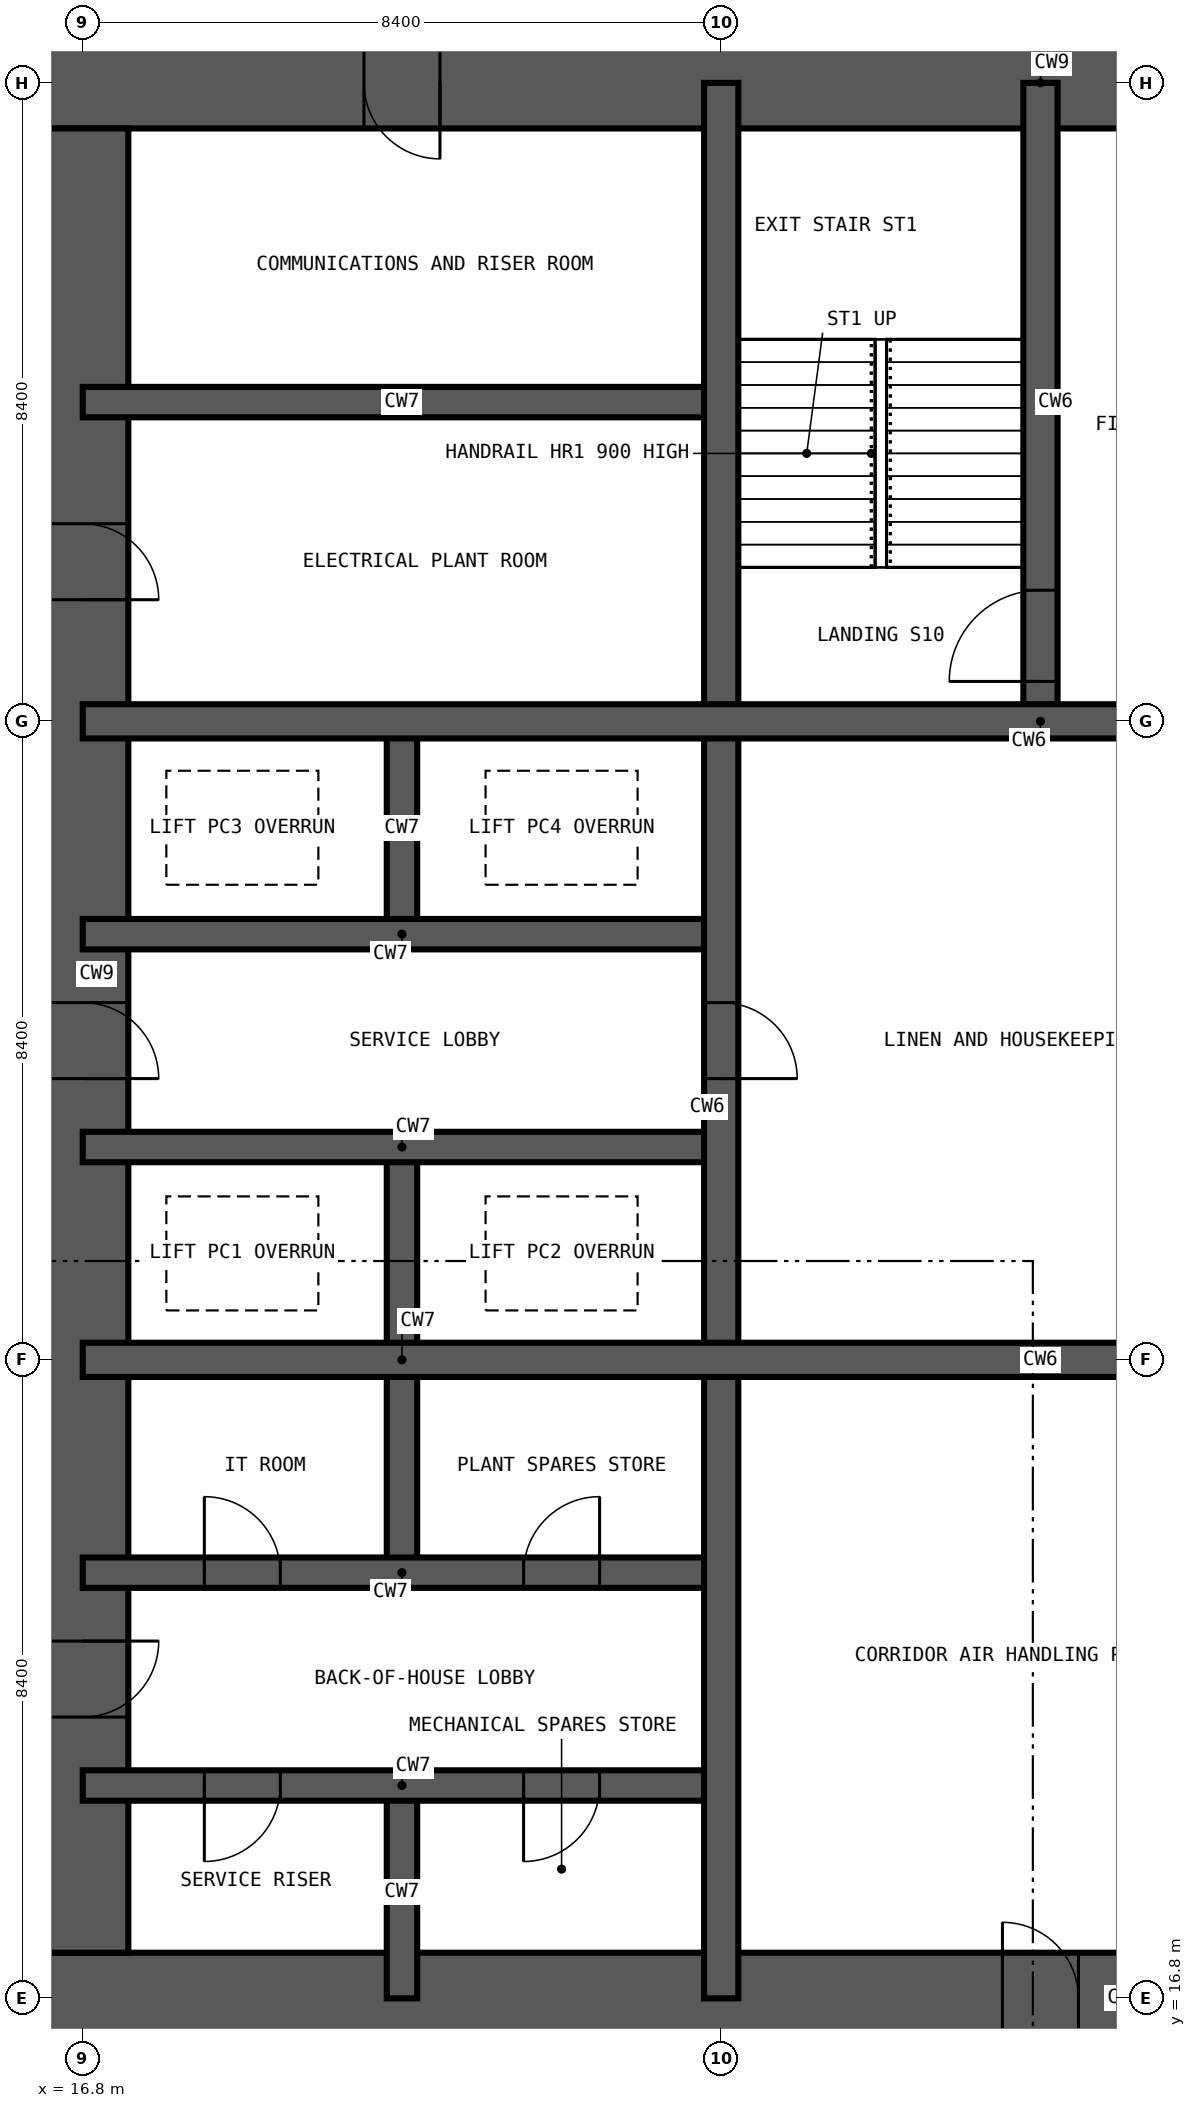
"""IFC4 building model, lengths in metres.
Left out: names, types, materials, properties, quantities, classifications, styles, units other than length and angle.
Written with IfcOpenShell. Run it as: python <this file> out.ifc"""

import sys

from ifc_helpers import new_model, si_unit, direction, frame, frame_2d, origin, place, context, subcontext, project, spatial, rectangle, extrude, element, fill, save


model = new_model("IFC4")
c1 = context("Model", 3, precision=1e-05, world=origin(), true_north=direction((0.0, 1.0)))
c2 = subcontext(c1, "Body", "Model", "MODEL_VIEW")
j1 = project(units=[si_unit("LENGTHUNIT", "METRE"), si_unit("PLANEANGLEUNIT", "RADIAN")], contexts=[c1])
p1 = place(None, origin())
s1 = spatial("IfcSite", under=j1, at=p1, CompositionType="ELEMENT")
p2 = place(p1, origin())
s2 = spatial("IfcBuilding", under=s1, at=p2, CompositionType="ELEMENT")
p3 = place(p2, frame((0.0, 0.0, 220.2)))
s3 = spatial("IfcBuildingStorey", under=s2, at=p3, CompositionType="ELEMENT", Elevation=220.2)
p4 = place(p3, frame((16.2, 16.8, -0.4), z_axis=(0.0, 0.0, 1.0), x_axis=(1.0, 0.0, 0.0)))
e1 = element("IfcWall", 1, at=p4, inside=s3, PredefinedType="SHEAR", context=c2, shape_type="SweptSolid", body=[
    extrude(rectangle(XDim=26.4, YDim=1.2, at=frame_2d((13.2, 0.0))), origin(), (0.0, 0.0, 1.0), 5.45),
])
p5 = place(p4, frame((12.7, 0.0, 0.4)))
e2 = element("IfcOpeningElement", 2, at=p5, cuts=e1, PredefinedType="OPENING", context=c2, shape_type="SweptSolid", body=[
    extrude(rectangle(XDim=1.0, YDim=2.1, at=frame_2d((0.5, 1.05))), frame((0.0, 0.61, 0.0), z_axis=(0.0, -1.0, 0.0), x_axis=(1.0, 0.0, 0.0)), (0.0, 0.0, 1.0), 1.22),
])
p6 = place(p4, frame((19.0, 0.0, 0.4)))
e3 = element("IfcOpeningElement", 3, at=p6, cuts=e1, PredefinedType="OPENING", context=c2, shape_type="SweptSolid", body=[
    extrude(rectangle(XDim=1.0, YDim=2.1, at=frame_2d((0.5, 1.05))), frame((0.0, 0.61, 0.0), z_axis=(0.0, -1.0, 0.0), x_axis=(1.0, 0.0, 0.0)), (0.0, 0.0, 1.0), 1.22),
])
p7 = place(p3, frame((42.6, 42.0, -0.4), z_axis=(0.0, 0.0, 1.0), x_axis=(-1.0, 0.0, 0.0)))
e4 = element("IfcWall", 4, at=p7, inside=s3, PredefinedType="SHEAR", context=c2, shape_type="SweptSolid", body=[
    extrude(rectangle(XDim=26.4, YDim=1.2, at=frame_2d((13.2, 0.0))), origin(), (0.0, 0.0, 1.0), 5.45),
])
p8 = place(p7, frame((21.1, 0.0, 0.4)))
e5 = element("IfcOpeningElement", 5, at=p8, cuts=e4, PredefinedType="OPENING", context=c2, shape_type="SweptSolid", body=[
    extrude(rectangle(XDim=1.0, YDim=2.1, at=frame_2d((0.5, 1.05))), frame((0.0, 0.61, 0.0), z_axis=(0.0, -1.0, 0.0), x_axis=(1.0, 0.0, 0.0)), (0.0, 0.0, 1.0), 1.22),
])
p9 = place(p7, frame((10.5, 0.0, 0.4)))
e6 = element("IfcOpeningElement", 6, at=p9, cuts=e4, PredefinedType="OPENING", context=c2, shape_type="SweptSolid", body=[
    extrude(rectangle(XDim=1.2, YDim=2.2, at=frame_2d((0.6, 1.1))), frame((0.0, 0.61, 0.0), z_axis=(0.0, -1.0, 0.0), x_axis=(1.0, 0.0, 0.0)), (0.0, 0.0, 1.0), 1.22),
])
p10 = place(p3, frame((16.8, 41.4, -0.4), z_axis=(0.0, 0.0, 1.0), x_axis=(0.0, -1.0, 0.0)))
e7 = element("IfcWall", 7, at=p10, inside=s3, PredefinedType="SHEAR", context=c2, shape_type="SweptSolid", body=[
    extrude(rectangle(XDim=24.0, YDim=1.2, at=frame_2d((12.0, 0.0))), origin(), (0.0, 0.0, 1.0), 5.45),
])
p11 = place(p10, frame((11.5, 0.0, 0.4)))
e8 = element("IfcOpeningElement", 8, at=p11, cuts=e7, PredefinedType="OPENING", context=c2, shape_type="SweptSolid", body=[
    extrude(rectangle(XDim=1.0, YDim=2.1, at=frame_2d((0.5, 1.05))), frame((0.0, 0.61, 0.0), z_axis=(0.0, -1.0, 0.0), x_axis=(1.0, 0.0, 0.0)), (0.0, 0.0, 1.0), 1.22),
])
p12 = place(p10, frame((19.9, 0.0, 0.4)))
e9 = element("IfcOpeningElement", 9, at=p12, cuts=e7, PredefinedType="OPENING", context=c2, shape_type="SweptSolid", body=[
    extrude(rectangle(XDim=1.0, YDim=2.1, at=frame_2d((0.5, 1.05))), frame((0.0, 0.61, 0.0), z_axis=(0.0, -1.0, 0.0), x_axis=(1.0, 0.0, 0.0)), (0.0, 0.0, 1.0), 1.22),
])
p13 = place(p10, frame((5.2, 0.0, 0.4)))
e10 = element("IfcOpeningElement", 10, at=p13, cuts=e7, PredefinedType="OPENING", context=c2, shape_type="SweptSolid", body=[
    extrude(rectangle(XDim=1.0, YDim=2.1, at=frame_2d((0.5, 1.05))), frame((0.0, 0.61, 0.0), z_axis=(0.0, -1.0, 0.0), x_axis=(1.0, 0.0, 0.0)), (0.0, 0.0, 1.0), 1.22),
])
p14 = place(p3, frame((21.0, 16.8, -0.4), z_axis=(0.0, 0.0, 1.0), x_axis=(0.0, 1.0, 0.0)))
e11 = element("IfcWall", 11, at=p14, inside=s3, PredefinedType="SHEAR", context=c2, shape_type="SweptSolid", body=[
    extrude(rectangle(XDim=2.8, YDim=0.4, at=frame_2d((1.4, 0.0))), origin(), (0.0, 0.0, 1.0), 5.45),
])
p15 = place(p3, frame((21.0, 22.4, -0.4), z_axis=(0.0, 0.0, 1.0), x_axis=(0.0, 1.0, 0.0)))
e12 = element("IfcWall", 12, at=p15, inside=s3, PredefinedType="SHEAR", context=c2, shape_type="SweptSolid", body=[
    extrude(rectangle(XDim=5.6, YDim=0.4, at=frame_2d((2.8, 0.0))), origin(), (0.0, 0.0, 1.0), 5.45),
])
p16 = place(p3, frame((21.0, 30.8, -0.4), z_axis=(0.0, 0.0, 1.0), x_axis=(0.0, 1.0, 0.0)))
e13 = element("IfcWall", 13, at=p16, inside=s3, PredefinedType="SHEAR", context=c2, shape_type="SweptSolid", body=[
    extrude(rectangle(XDim=2.8, YDim=0.4, at=frame_2d((1.4, 0.0))), origin(), (0.0, 0.0, 1.0), 5.45),
])
p17 = place(p3, frame((16.8, 19.6, -0.4), z_axis=(0.0, 0.0, 1.0), x_axis=(1.0, 0.0, 0.0)))
e14 = element("IfcWall", 14, at=p17, inside=s3, PredefinedType="SHEAR", context=c2, shape_type="SweptSolid", body=[
    extrude(rectangle(XDim=8.4, YDim=0.4, at=frame_2d((4.2, 0.0))), origin(), (0.0, 0.0, 1.0), 5.45),
])
p18 = place(p17, frame((1.6, 0.0, 0.4)))
e15 = element("IfcOpeningElement", 15, at=p18, cuts=e14, PredefinedType="OPENING", context=c2, shape_type="SweptSolid", body=[
    extrude(rectangle(XDim=1.0, YDim=2.1, at=frame_2d((0.5, 1.05))), frame((0.0, 0.21, 0.0), z_axis=(0.0, -1.0, 0.0), x_axis=(1.0, 0.0, 0.0)), (0.0, 0.0, 1.0), 0.42),
])
p19 = place(p17, frame((5.8, 0.0, 0.4)))
e16 = element("IfcOpeningElement", 16, at=p19, cuts=e14, PredefinedType="OPENING", context=c2, shape_type="SweptSolid", body=[
    extrude(rectangle(XDim=1.0, YDim=2.1, at=frame_2d((0.5, 1.05))), frame((0.0, 0.21, 0.0), z_axis=(0.0, -1.0, 0.0), x_axis=(1.0, 0.0, 0.0)), (0.0, 0.0, 1.0), 0.42),
])
p20 = place(p3, frame((16.8, 22.4, -0.4), z_axis=(0.0, 0.0, 1.0), x_axis=(1.0, 0.0, 0.0)))
e17 = element("IfcWall", 17, at=p20, inside=s3, PredefinedType="SHEAR", context=c2, shape_type="SweptSolid", body=[
    extrude(rectangle(XDim=8.4, YDim=0.4, at=frame_2d((4.2, 0.0))), origin(), (0.0, 0.0, 1.0), 5.45),
])
p21 = place(p20, frame((1.6, 0.0, 0.4)))
e18 = element("IfcOpeningElement", 18, at=p21, cuts=e17, PredefinedType="OPENING", context=c2, shape_type="SweptSolid", body=[
    extrude(rectangle(XDim=1.0, YDim=2.1, at=frame_2d((0.5, 1.05))), frame((0.0, 0.21, 0.0), z_axis=(0.0, -1.0, 0.0), x_axis=(1.0, 0.0, 0.0)), (0.0, 0.0, 1.0), 0.42),
])
p22 = place(p20, frame((5.8, 0.0, 0.4)))
e19 = element("IfcOpeningElement", 19, at=p22, cuts=e17, PredefinedType="OPENING", context=c2, shape_type="SweptSolid", body=[
    extrude(rectangle(XDim=1.0, YDim=2.1, at=frame_2d((0.5, 1.05))), frame((0.0, 0.21, 0.0), z_axis=(0.0, -1.0, 0.0), x_axis=(1.0, 0.0, 0.0)), (0.0, 0.0, 1.0), 0.42),
])
for number, where, z_axis, x_axis in (
    (20, (16.8, 28.0, -0.4), (0.0, 0.0, 1.0), (1.0, 0.0, 0.0)),
    (21, (16.8, 30.8, -0.4), (0.0, 0.0, 1.0), (1.0, 0.0, 0.0)),
    (22, (16.8, 37.8, -0.4), (0.0, 0.0, 1.0), (1.0, 0.0, 0.0)),
):
    element("IfcWall", number, at=place(p3, frame(where, z_axis=z_axis, x_axis=x_axis)), inside=s3, PredefinedType="SHEAR", context=c2, shape_type="SweptSolid", body=[
        extrude(rectangle(XDim=8.4, YDim=0.4, at=frame_2d((4.2, 0.0))), origin(), (0.0, 0.0, 1.0), 5.45),
    ])
p23 = place(p3, frame((25.2, 16.8, -0.4), z_axis=(0.0, 0.0, 1.0), x_axis=(0.0, 1.0, 0.0)))
e23 = element("IfcWall", 23, at=p23, inside=s3, PredefinedType="SHEAR", context=c2, shape_type="SweptSolid", body=[
    extrude(rectangle(XDim=25.2, YDim=0.45, at=frame_2d((12.6, 0.0))), origin(), (0.0, 0.0, 1.0), 5.45),
])
p24 = place(p23, frame((12.1, 0.0, 0.4)))
e24 = element("IfcOpeningElement", 24, at=p24, cuts=e23, PredefinedType="OPENING", context=c2, shape_type="SweptSolid", body=[
    extrude(rectangle(XDim=1.0, YDim=2.1, at=frame_2d((0.5, 1.05))), frame((0.0, 0.235, 0.0), z_axis=(0.0, -1.0, 0.0), x_axis=(1.0, 0.0, 0.0)), (0.0, 0.0, 1.0), 0.47),
])
p25 = place(p3, frame((29.4, 33.6, -0.4), z_axis=(0.0, 0.0, 1.0), x_axis=(0.0, 1.0, 0.0)))
e25 = element("IfcWall", 25, at=p25, inside=s3, PredefinedType="SHEAR", context=c2, shape_type="SweptSolid", body=[
    extrude(rectangle(XDim=8.4, YDim=0.45, at=frame_2d((4.2, 0.0))), origin(), (0.0, 0.0, 1.0), 5.45),
])
p26 = place(p25, frame((0.525, 0.0, 0.4)))
e26 = element("IfcOpeningElement", 26, at=p26, cuts=e25, PredefinedType="OPENING", context=c2, shape_type="SweptSolid", body=[
    extrude(rectangle(XDim=1.2, YDim=2.2, at=frame_2d((0.6, 1.1))), frame((0.0, 0.235, 0.0), z_axis=(0.0, -1.0, 0.0), x_axis=(1.0, 0.0, 0.0)), (0.0, 0.0, 1.0), 0.47),
])
for number, where, z_axis, x_axis in (
    (27, (16.8, 25.2, -0.4), (0.0, 0.0, 1.0), (1.0, 0.0, 0.0)),
    (28, (16.8, 33.6, -0.4), (0.0, 0.0, 1.0), (1.0, 0.0, 0.0)),
):
    element("IfcWall", number, at=place(p3, frame(where, z_axis=z_axis, x_axis=x_axis)), inside=s3, PredefinedType="SHEAR", context=c2, shape_type="SweptSolid", body=[
        extrude(rectangle(XDim=25.2, YDim=0.45, at=frame_2d((12.6, 0.0))), origin(), (0.0, 0.0, 1.0), 5.45),
    ])
p27 = place(p26, origin())
e29 = element("IfcDoor", 29, at=p27, inside=s3, OperationType="SINGLE_SWING_LEFT", PredefinedType="DOOR", context=c2, shape_type="SweptSolid", body=[
    extrude(rectangle(XDim=1.2, YDim=2.2, at=frame_2d((0.6, 1.1))), frame((0.0, 0.025, 0.0), z_axis=(0.0, -1.0, 0.0), x_axis=(1.0, 0.0, 0.0)), (0.0, 0.0, 1.0), 0.05),
])
fill(e26, e29)
p28 = place(p11, origin())
e30 = element("IfcDoor", 30, at=p28, inside=s3, OperationType="SINGLE_SWING_RIGHT", PredefinedType="DOOR", context=c2, shape_type="SweptSolid", body=[
    extrude(rectangle(XDim=1.0, YDim=2.1, at=frame_2d((0.5, 1.05))), frame((0.0, 0.025, 0.0), z_axis=(0.0, -1.0, 0.0), x_axis=(1.0, 0.0, 0.0)), (0.0, 0.0, 1.0), 0.05),
])
fill(e8, e30)
p29 = place(p18, frame((1.0, 0.0, 0.0), z_axis=(0.0, 0.0, 1.0), x_axis=(-1.0, 0.0, 0.0)))
e31 = element("IfcDoor", 31, at=p29, inside=s3, OperationType="SINGLE_SWING_RIGHT", PredefinedType="DOOR", context=c2, shape_type="SweptSolid", body=[
    extrude(rectangle(XDim=1.0, YDim=2.1, at=frame_2d((0.5, 1.05))), frame((0.0, 0.025, 0.0), z_axis=(0.0, -1.0, 0.0), x_axis=(1.0, 0.0, 0.0)), (0.0, 0.0, 1.0), 0.05),
])
fill(e15, e31)
p30 = place(p19, frame((1.0, 0.0, 0.0), z_axis=(0.0, 0.0, 1.0), x_axis=(-1.0, 0.0, 0.0)))
e32 = element("IfcDoor", 32, at=p30, inside=s3, OperationType="SINGLE_SWING_RIGHT", PredefinedType="DOOR", context=c2, shape_type="SweptSolid", body=[
    extrude(rectangle(XDim=1.0, YDim=2.1, at=frame_2d((0.5, 1.05))), frame((0.0, 0.025, 0.0), z_axis=(0.0, -1.0, 0.0), x_axis=(1.0, 0.0, 0.0)), (0.0, 0.0, 1.0), 0.05),
])
fill(e16, e32)
p31 = place(p21, origin())
e33 = element("IfcDoor", 33, at=p31, inside=s3, OperationType="SINGLE_SWING_LEFT", PredefinedType="DOOR", context=c2, shape_type="SweptSolid", body=[
    extrude(rectangle(XDim=1.0, YDim=2.1, at=frame_2d((0.5, 1.05))), frame((0.0, 0.025, 0.0), z_axis=(0.0, -1.0, 0.0), x_axis=(1.0, 0.0, 0.0)), (0.0, 0.0, 1.0), 0.05),
])
fill(e18, e33)
p32 = place(p22, origin())
e34 = element("IfcDoor", 34, at=p32, inside=s3, OperationType="SINGLE_SWING_RIGHT", PredefinedType="DOOR", context=c2, shape_type="SweptSolid", body=[
    extrude(rectangle(XDim=1.0, YDim=2.1, at=frame_2d((0.5, 1.05))), frame((0.0, 0.025, 0.0), z_axis=(0.0, -1.0, 0.0), x_axis=(1.0, 0.0, 0.0)), (0.0, 0.0, 1.0), 0.05),
])
fill(e19, e34)
p33 = place(p12, origin())
e35 = element("IfcDoor", 35, at=p33, inside=s3, OperationType="SINGLE_SWING_LEFT", PredefinedType="DOOR", context=c2, shape_type="SweptSolid", body=[
    extrude(rectangle(XDim=1.0, YDim=2.1, at=frame_2d((0.5, 1.05))), frame((0.0, 0.025, 0.0), z_axis=(0.0, -1.0, 0.0), x_axis=(1.0, 0.0, 0.0)), (0.0, 0.0, 1.0), 0.05),
])
fill(e9, e35)
p34 = place(p13, origin())
e36 = element("IfcDoor", 36, at=p34, inside=s3, OperationType="SINGLE_SWING_RIGHT", PredefinedType="DOOR", context=c2, shape_type="SweptSolid", body=[
    extrude(rectangle(XDim=1.0, YDim=2.1, at=frame_2d((0.5, 1.05))), frame((0.0, 0.025, 0.0), z_axis=(0.0, -1.0, 0.0), x_axis=(1.0, 0.0, 0.0)), (0.0, 0.0, 1.0), 0.05),
])
fill(e10, e36)
p35 = place(p8, origin())
e37 = element("IfcDoor", 37, at=p35, inside=s3, OperationType="SINGLE_SWING_LEFT", PredefinedType="DOOR", context=c2, shape_type="SweptSolid", body=[
    extrude(rectangle(XDim=1.0, YDim=2.1, at=frame_2d((0.5, 1.05))), frame((0.0, 0.025, 0.0), z_axis=(0.0, -1.0, 0.0), x_axis=(1.0, 0.0, 0.0)), (0.0, 0.0, 1.0), 0.05),
])
fill(e5, e37)
p36 = place(p24, frame((1.0, 0.0, 0.0), z_axis=(0.0, 0.0, 1.0), x_axis=(-1.0, 0.0, 0.0)))
e38 = element("IfcDoor", 38, at=p36, inside=s3, OperationType="SINGLE_SWING_RIGHT", PredefinedType="DOOR", context=c2, shape_type="SweptSolid", body=[
    extrude(rectangle(XDim=1.0, YDim=2.1, at=frame_2d((0.5, 1.05))), frame((0.0, 0.025, 0.0), z_axis=(0.0, -1.0, 0.0), x_axis=(1.0, 0.0, 0.0)), (0.0, 0.0, 1.0), 0.05),
])
fill(e24, e38)
p37 = place(p5, origin())
e39 = element("IfcDoor", 39, at=p37, inside=s3, OperationType="SINGLE_SWING_LEFT", PredefinedType="DOOR", context=c2, shape_type="SweptSolid", body=[
    extrude(rectangle(XDim=1.0, YDim=2.1, at=frame_2d((0.5, 1.05))), frame((0.0, 0.025, 0.0), z_axis=(0.0, -1.0, 0.0), x_axis=(1.0, 0.0, 0.0)), (0.0, 0.0, 1.0), 0.05),
])
fill(e2, e39)
save(model, sys.argv[1])
